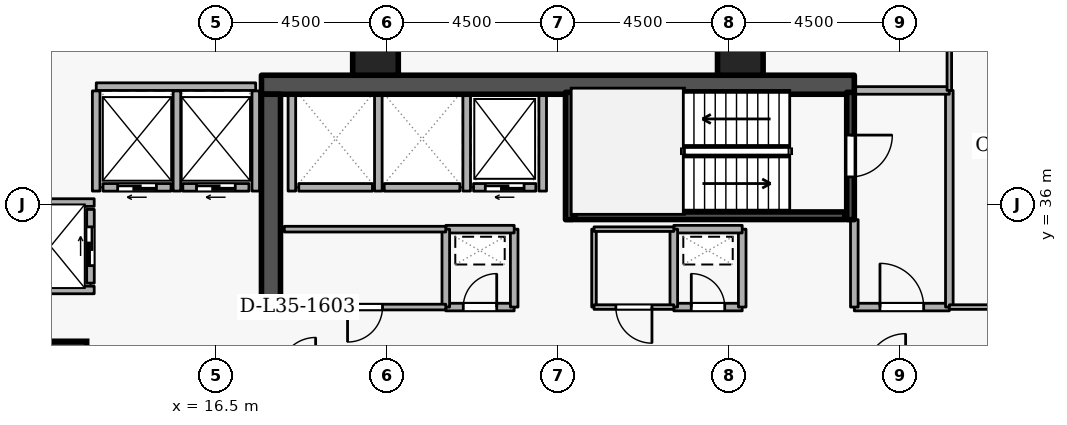
"""IFC4 building model, lengths in metres.
Left out: names, types, materials, properties, quantities, classifications, styles, units other than length and angle.
Written with IfcOpenShell. Run it as: python <this file> out.ifc"""

import sys

from ifc_helpers import new_model, si_unit, direction, frame, frame_2d, origin, origin_2d, place, context, subcontext, project, spatial, rectangle, extrude, element, fill, save


model = new_model("IFC4")
c1 = context("Model", 3, precision=1e-05, world=origin(), true_north=direction((0.0, 1.0)))
c2 = subcontext(c1, "Body", "Model", "MODEL_VIEW")
j1 = project(units=[si_unit("LENGTHUNIT", "METRE"), si_unit("PLANEANGLEUNIT", "RADIAN")], contexts=[c1])
p1 = place(None, origin())
s1 = spatial("IfcSite", under=j1, at=p1, CompositionType="ELEMENT")
p2 = place(p1, origin())
s2 = spatial("IfcBuilding", under=s1, at=p2, CompositionType="ELEMENT")
p3 = place(p2, frame((0.0, 0.0, 134.1)))
s3 = spatial("IfcBuildingStorey", under=s2, at=p3, CompositionType="ELEMENT", Elevation=134.1)
p4 = place(p3, frame((17.7, 39.15, 0.0), z_axis=(0.0, 0.0, 1.0), x_axis=(1.0, 0.0, 0.0)))
e1 = element("IfcWall", 1, at=p4, inside=s3, PredefinedType="SHEAR", context=c2, shape_type="SweptSolid", body=[
    extrude(rectangle(XDim=15.6, YDim=0.5, at=frame_2d((7.8, 0.0))), origin(), (0.0, 0.0, 1.0), 3.6),
])
p5 = place(p3, frame((17.95, 33.1, 0.0), z_axis=(0.0, 0.0, 1.0), x_axis=(0.0, 1.0, 0.0)))
e2 = element("IfcWall", 2, at=p5, inside=s3, PredefinedType="SHEAR", context=c2, shape_type="SweptSolid", body=[
    extrude(rectangle(XDim=5.8, YDim=0.5, at=frame_2d((2.9, 0.0))), origin(), (0.0, 0.0, 1.0), 3.6),
])
for number, where, z_axis, x_axis in (
    (3, (12.5, 31.8, 0.0), (0.0, 0.0, 1.0), (1.0, 0.0, 0.0)),
    (4, (20.7, 40.0, 0.0), (0.0, 0.0, 1.0), (1.0, 0.0, 0.0)),
    (5, (30.3, 40.0, 0.0), (0.0, 0.0, 1.0), (1.0, 0.0, 0.0)),
):
    element("IfcColumn", number, at=place(p3, frame(where, z_axis=z_axis, x_axis=x_axis)), inside=s3, PredefinedType="COLUMN", context=c2, shape_type="SweptSolid", body=[
        extrude(rectangle(XDim=1.2, YDim=1.2, at=origin_2d()), origin(), (0.0, 0.0, 1.0), 3.6),
    ])
p6 = place(p3, frame((24.92, 36.45, 0.0), z_axis=(0.0, 0.0, 1.0), x_axis=(-1.0, 0.0, 0.0)))
e6 = element("IfcWall", 6, at=p6, inside=s3, PredefinedType="STANDARD", context=c2, shape_type="SweptSolid", body=[
    extrude(rectangle(XDim=1.64, YDim=0.2, at=frame_2d((0.82, 0.0))), origin(), (0.0, 0.0, 1.0), 3.34),
])
p7 = place(p6, frame((0.31, 0.0, 0.0)))
e7 = element("IfcOpeningElement", 7, at=p7, cuts=e6, PredefinedType="OPENING", context=c2, shape_type="SweptSolid", body=[
    extrude(rectangle(XDim=1.02, YDim=2.06, at=frame_2d((0.51, 1.03))), frame((0.0, 0.11, 0.0), z_axis=(0.0, -1.0, 0.0), x_axis=(1.0, 0.0, 0.0)), (0.0, 0.0, 1.0), 0.22),
])
p8 = place(p3, frame((22.92, 36.45, 0.0), z_axis=(0.0, 0.0, 1.0), x_axis=(-1.0, 0.0, 0.0)))
e8 = element("IfcWall", 8, at=p8, inside=s3, PredefinedType="STANDARD", context=c2, shape_type="SweptSolid", body=[
    extrude(rectangle(XDim=1.99, YDim=0.2, at=frame_2d((0.995, 0.0))), origin(), (0.0, 0.0, 1.0), 3.34),
])
p9 = place(p3, frame((20.62, 36.45, 0.0), z_axis=(0.0, 0.0, 1.0), x_axis=(-1.0, 0.0, 0.0)))
e9 = element("IfcWall", 9, at=p9, inside=s3, PredefinedType="STANDARD", context=c2, shape_type="SweptSolid", body=[
    extrude(rectangle(XDim=1.94, YDim=0.2, at=frame_2d((0.97, 0.0))), origin(), (0.0, 0.0, 1.0), 3.34),
])
p10 = place(p3, frame((17.37, 36.45, 0.0), z_axis=(0.0, 0.0, 1.0), x_axis=(-1.0, 0.0, 0.0)))
e10 = element("IfcWall", 10, at=p10, inside=s3, PredefinedType="STANDARD", context=c2, shape_type="SweptSolid", body=[
    extrude(rectangle(XDim=1.74, YDim=0.2, at=frame_2d((0.87, 0.0))), origin(), (0.0, 0.0, 1.0), 3.34),
])
p11 = place(p10, frame((0.36, 0.0, 0.0)))
e11 = element("IfcOpeningElement", 11, at=p11, cuts=e10, PredefinedType="OPENING", context=c2, shape_type="SweptSolid", body=[
    extrude(rectangle(XDim=1.02, YDim=2.06, at=frame_2d((0.51, 1.03))), frame((0.0, 0.11, 0.0), z_axis=(0.0, -1.0, 0.0), x_axis=(1.0, 0.0, 0.0)), (0.0, 0.0, 1.0), 0.22),
])
p12 = place(p3, frame((15.32, 36.45, 0.0), z_axis=(0.0, 0.0, 1.0), x_axis=(-1.0, 0.0, 0.0)))
e12 = element("IfcWall", 12, at=p12, inside=s3, PredefinedType="STANDARD", context=c2, shape_type="SweptSolid", body=[
    extrude(rectangle(XDim=1.79, YDim=0.2, at=frame_2d((0.895, 0.0))), origin(), (0.0, 0.0, 1.0), 3.34),
])
p13 = place(p12, frame((0.385, 0.0, 0.0)))
e13 = element("IfcOpeningElement", 13, at=p13, cuts=e12, PredefinedType="OPENING", context=c2, shape_type="SweptSolid", body=[
    extrude(rectangle(XDim=1.02, YDim=2.06, at=frame_2d((0.51, 1.03))), frame((0.0, 0.11, 0.0), z_axis=(0.0, -1.0, 0.0), x_axis=(1.0, 0.0, 0.0)), (0.0, 0.0, 1.0), 0.22),
])
p14 = place(p3, frame((13.2, 33.93, 0.0), z_axis=(0.0, 0.0, 1.0), x_axis=(0.0, 1.0, 0.0)))
e14 = element("IfcWall", 14, at=p14, inside=s3, PredefinedType="STANDARD", context=c2, shape_type="SweptSolid", body=[
    extrude(rectangle(XDim=1.94, YDim=0.2, at=frame_2d((0.97, 0.0))), origin(), (0.0, 0.0, 1.0), 3.34),
])
p15 = place(p14, frame((0.46, 0.0, 0.0)))
e15 = element("IfcOpeningElement", 15, at=p15, cuts=e14, PredefinedType="OPENING", context=c2, shape_type="SweptSolid", body=[
    extrude(rectangle(XDim=1.02, YDim=2.06, at=frame_2d((0.51, 1.03))), frame((0.0, 0.11, 0.0), z_axis=(0.0, -1.0, 0.0), x_axis=(1.0, 0.0, 0.0)), (0.0, 0.0, 1.0), 0.22),
])
for number, where, z_axis, x_axis in (
    (16, (25.1, 36.352, 0.0), (0.0, 0.0, 1.0), (0.0, 1.0, 0.0)),
    (17, (23.1, 36.352, 0.0), (0.0, 0.0, 1.0), (0.0, 1.0, 0.0)),
    (18, (20.775, 36.352, 0.0), (0.0, 0.0, 1.0), (0.0, 1.0, 0.0)),
    (19, (18.5, 36.352, 0.0), (0.0, 0.0, 1.0), (0.0, 1.0, 0.0)),
):
    element("IfcWall", number, at=place(p3, frame(where, z_axis=z_axis, x_axis=x_axis)), inside=s3, PredefinedType="STANDARD", context=c2, shape_type="SweptSolid", body=[
        extrude(rectangle(XDim=2.536, YDim=0.2, at=frame_2d((1.268, 0.0))), origin(), (0.0, 0.0, 1.0), 3.34),
    ])
p16 = place(p3, frame((13.352, 39.1, 0.0), z_axis=(0.0, 0.0, 1.0), x_axis=(1.0, 0.0, 0.0)))
e20 = element("IfcWall", 20, at=p16, inside=s3, PredefinedType="STANDARD", context=c2, shape_type="SweptSolid", body=[
    extrude(rectangle(XDim=4.196, YDim=0.2, at=frame_2d((2.098, 0.0))), origin(), (0.0, 0.0, 1.0), 3.34),
])
p17 = place(p3, frame((17.55, 36.352, 0.0), z_axis=(0.0, 0.0, 1.0), x_axis=(0.0, 1.0, 0.0)))
e21 = element("IfcWall", 21, at=p17, inside=s3, PredefinedType="STANDARD", context=c2, shape_type="SweptSolid", body=[
    extrude(rectangle(XDim=2.636, YDim=0.2, at=frame_2d((1.318, 0.0))), origin(), (0.0, 0.0, 1.0), 2.545),
])
for number, where, z_axis, x_axis in (
    (22, (15.475, 36.352, 0.0), (0.0, 0.0, 1.0), (0.0, 1.0, 0.0)),
    (23, (13.35, 36.352, 0.0), (0.0, 0.0, 1.0), (0.0, 1.0, 0.0)),
):
    element("IfcWall", number, at=place(p3, frame(where, z_axis=z_axis, x_axis=x_axis)), inside=s3, PredefinedType="STANDARD", context=c2, shape_type="SweptSolid", body=[
        extrude(rectangle(XDim=2.636, YDim=0.2, at=frame_2d((1.318, 0.0))), origin(), (0.0, 0.0, 1.0), 3.34),
    ])
for number, where, z_axis, x_axis in (
    (24, (11.002, 36.05, 0.0), (0.0, 0.0, 1.0), (1.0, 0.0, 0.0)),
    (25, (11.002, 33.75, 0.0), (0.0, 0.0, 1.0), (1.0, 0.0, 0.0)),
):
    element("IfcWall", number, at=place(p3, frame(where, z_axis=z_axis, x_axis=x_axis)), inside=s3, PredefinedType="STANDARD", context=c2, shape_type="SweptSolid", body=[
        extrude(rectangle(XDim=2.296, YDim=0.2, at=frame_2d((1.148, 0.0))), origin(), (0.0, 0.0, 1.0), 3.34),
    ])
p18 = place(p3, frame((33.2, 38.95, 0.0), z_axis=(0.0, 0.0, 1.0), x_axis=(0.0, -1.0, 0.0)))
e26 = element("IfcWall", 26, at=p18, inside=s3, PredefinedType="SHEAR", context=c2, shape_type="SweptSolid", body=[
    extrude(rectangle(XDim=3.35, YDim=0.2, at=frame_2d((1.675, 0.0))), origin(), (0.0, 0.0, 1.0), 3.6),
])
p19 = place(p18, frame((1.125, 0.0, 0.0)))
e27 = element("IfcOpeningElement", 27, at=p19, cuts=e26, PredefinedType="OPENING", context=c2, shape_type="SweptSolid", body=[
    extrude(rectangle(XDim=1.1, YDim=2.1, at=frame_2d((0.55, 1.05))), frame((0.0, 0.11, 0.0), z_axis=(0.0, -1.0, 0.0), x_axis=(1.0, 0.0, 0.0)), (0.0, 0.0, 1.0), 0.22),
])
p20 = place(p3, frame((25.8, 35.6, 0.0), z_axis=(0.0, 0.0, 1.0), x_axis=(0.0, 1.0, 0.0)))
e28 = element("IfcWall", 28, at=p20, inside=s3, PredefinedType="SHEAR", context=c2, shape_type="SweptSolid", body=[
    extrude(rectangle(XDim=3.35, YDim=0.2, at=frame_2d((1.675, 0.0))), origin(), (0.0, 0.0, 1.0), 3.6),
])
p21 = place(p3, frame((25.95, 35.703, 0.0), z_axis=(0.0, 0.0, 1.0), x_axis=(1.0, 0.0, 0.0)))
e29 = element("IfcWall", 29, at=p21, inside=s3, PredefinedType="SHEAR", context=c2, shape_type="SweptSolid", body=[
    extrude(rectangle(XDim=7.1, YDim=0.2, at=frame_2d((3.55, 0.0))), origin(), (0.0, 0.0, 1.0), 3.6),
])
p22 = place(p3, frame((33.3, 33.3, 0.0), z_axis=(0.0, 0.0, 1.0), x_axis=(1.0, 0.0, 0.0)))
e30 = element("IfcWall", 30, at=p22, inside=s3, PredefinedType="STANDARD", context=c2, shape_type="SweptSolid", body=[
    extrude(rectangle(XDim=2.5, YDim=0.2, at=frame_2d((1.25, 0.0))), origin(), (0.0, 0.0, 1.0), 3.34),
])
p23 = place(p22, frame((0.675, 0.0, 0.0)))
e31 = element("IfcOpeningElement", 31, at=p23, cuts=e30, PredefinedType="OPENING", context=c2, shape_type="SweptSolid", body=[
    extrude(rectangle(XDim=1.15, YDim=2.1, at=frame_2d((0.575, 1.05))), frame((0.0, 0.11, 0.0), z_axis=(0.0, -1.0, 0.0), x_axis=(1.0, 0.0, 0.0)), (0.0, 0.0, 1.0), 0.22),
])
p24 = place(p3, frame((35.8, 33.3, 0.0), z_axis=(0.0, 0.0, 1.0), x_axis=(0.0, 1.0, 0.0)))
e32 = element("IfcWall", 32, at=p24, inside=s3, PredefinedType="STANDARD", context=c2, shape_type="SweptSolid", body=[
    extrude(rectangle(XDim=5.7, YDim=0.2, at=frame_2d((2.85, 0.0))), origin(), (0.0, 0.0, 1.0), 3.34),
])
p25 = place(p3, frame((35.8, 39.0, 0.0), z_axis=(0.0, 0.0, 1.0), x_axis=(-1.0, 0.0, 0.0)))
e33 = element("IfcWall", 33, at=p25, inside=s3, PredefinedType="STANDARD", context=c2, shape_type="SweptSolid", body=[
    extrude(rectangle(XDim=2.5, YDim=0.2, at=frame_2d((1.25, 0.0))), origin(), (0.0, 0.0, 1.0), 3.34),
])
p26 = place(p3, frame((33.3, 35.6, 0.0), z_axis=(0.0, 0.0, 1.0), x_axis=(0.0, -1.0, 0.0)))
e34 = element("IfcWall", 34, at=p26, inside=s3, PredefinedType="STANDARD", context=c2, shape_type="SweptSolid", body=[
    extrude(rectangle(XDim=2.3, YDim=0.2, at=frame_2d((1.15, 0.0))), origin(), (0.0, 0.0, 1.0), 2.545),
])
p27 = place(p3, frame((22.55, 33.3, 0.0), z_axis=(0.0, 0.0, 1.0), x_axis=(1.0, 0.0, 0.0)))
e35 = element("IfcWall", 35, at=p27, inside=s3, PredefinedType="STANDARD", context=c2, shape_type="SweptSolid", body=[
    extrude(rectangle(XDim=1.8, YDim=0.2, at=frame_2d((0.9, 0.0))), origin(), (0.0, 0.0, 1.0), 3.34),
])
p28 = place(p27, frame((0.46, 0.0, 0.0)))
e36 = element("IfcOpeningElement", 36, at=p28, cuts=e35, PredefinedType="OPENING", context=c2, shape_type="SweptSolid", body=[
    extrude(rectangle(XDim=0.88, YDim=2.04, at=frame_2d((0.44, 1.02))), frame((0.0, 0.11, 0.0), z_axis=(0.0, -1.0, 0.0), x_axis=(1.0, 0.0, 0.0)), (0.0, 0.0, 1.0), 0.22),
])
p29 = place(p3, frame((24.35, 33.3, 0.0), z_axis=(0.0, 0.0, 1.0), x_axis=(0.0, 1.0, 0.0)))
e37 = element("IfcWall", 37, at=p29, inside=s3, PredefinedType="STANDARD", context=c2, shape_type="SweptSolid", body=[
    extrude(rectangle(XDim=2.05, YDim=0.2, at=frame_2d((1.025, 0.0))), origin(), (0.0, 0.0, 1.0), 3.34),
])
p30 = place(p3, frame((24.35, 35.35, 0.0), z_axis=(0.0, 0.0, 1.0), x_axis=(-1.0, 0.0, 0.0)))
e38 = element("IfcWall", 38, at=p30, inside=s3, PredefinedType="STANDARD", context=c2, shape_type="SweptSolid", body=[
    extrude(rectangle(XDim=1.8, YDim=0.2, at=frame_2d((0.9, 0.0))), origin(), (0.0, 0.0, 1.0), 3.34),
])
p31 = place(p3, frame((22.55, 35.35, 0.0), z_axis=(0.0, 0.0, 1.0), x_axis=(0.0, -1.0, 0.0)))
e39 = element("IfcWall", 39, at=p31, inside=s3, PredefinedType="STANDARD", context=c2, shape_type="SweptSolid", body=[
    extrude(rectangle(XDim=2.05, YDim=0.2, at=frame_2d((1.025, 0.0))), origin(), (0.0, 0.0, 1.0), 3.34),
])
p32 = place(p3, frame((28.55, 33.3, 0.0), z_axis=(0.0, 0.0, 1.0), x_axis=(1.0, 0.0, 0.0)))
e40 = element("IfcWall", 40, at=p32, inside=s3, PredefinedType="STANDARD", context=c2, shape_type="SweptSolid", body=[
    extrude(rectangle(XDim=1.8, YDim=0.2, at=frame_2d((0.9, 0.0))), origin(), (0.0, 0.0, 1.0), 3.34),
])
p33 = place(p32, frame((0.46, 0.0, 0.0)))
e41 = element("IfcOpeningElement", 41, at=p33, cuts=e40, PredefinedType="OPENING", context=c2, shape_type="SweptSolid", body=[
    extrude(rectangle(XDim=0.88, YDim=2.04, at=frame_2d((0.44, 1.02))), frame((0.0, 0.11, 0.0), z_axis=(0.0, -1.0, 0.0), x_axis=(1.0, 0.0, 0.0)), (0.0, 0.0, 1.0), 0.22),
])
p34 = place(p3, frame((30.35, 33.3, 0.0), z_axis=(0.0, 0.0, 1.0), x_axis=(0.0, 1.0, 0.0)))
e42 = element("IfcWall", 42, at=p34, inside=s3, PredefinedType="STANDARD", context=c2, shape_type="SweptSolid", body=[
    extrude(rectangle(XDim=2.05, YDim=0.2, at=frame_2d((1.025, 0.0))), origin(), (0.0, 0.0, 1.0), 3.34),
])
p35 = place(p3, frame((30.35, 35.35, 0.0), z_axis=(0.0, 0.0, 1.0), x_axis=(-1.0, 0.0, 0.0)))
e43 = element("IfcWall", 43, at=p35, inside=s3, PredefinedType="STANDARD", context=c2, shape_type="SweptSolid", body=[
    extrude(rectangle(XDim=1.8, YDim=0.2, at=frame_2d((0.9, 0.0))), origin(), (0.0, 0.0, 1.0), 3.34),
])
p36 = place(p3, frame((28.55, 35.35, 0.0), z_axis=(0.0, 0.0, 1.0), x_axis=(0.0, -1.0, 0.0)))
e44 = element("IfcWall", 44, at=p36, inside=s3, PredefinedType="STANDARD", context=c2, shape_type="SweptSolid", body=[
    extrude(rectangle(XDim=2.05, YDim=0.2, at=frame_2d((1.025, 0.0))), origin(), (0.0, 0.0, 1.0), 3.34),
])
p37 = place(p3, frame((18.3, 35.35, 0.0), z_axis=(0.0, 0.0, 1.0), x_axis=(1.0, 0.0, 0.0)))
e45 = element("IfcWall", 45, at=p37, inside=s3, PredefinedType="PARTITIONING", context=c2, shape_type="SweptSolid", body=[
    extrude(rectangle(XDim=4.25, YDim=0.15, at=frame_2d((2.125, 0.0))), origin(), (0.0, 0.0, 1.0), 3.34),
])
p38 = place(p3, frame((22.55, 33.3, 0.0), z_axis=(0.0, 0.0, 1.0), x_axis=(-1.0, 0.0, 0.0)))
e46 = element("IfcWall", 46, at=p38, inside=s3, PredefinedType="PARTITIONING", context=c2, shape_type="SweptSolid", body=[
    extrude(rectangle(XDim=4.25, YDim=0.15, at=frame_2d((2.125, 0.0))), origin(), (0.0, 0.0, 1.0), 3.34),
])
p39 = place(p38, frame((1.665, 0.0, 0.0)))
e47 = element("IfcOpeningElement", 47, at=p39, cuts=e46, PredefinedType="OPENING", context=c2, shape_type="SweptSolid", body=[
    extrude(rectangle(XDim=0.92, YDim=2.08, at=frame_2d((0.46, 1.04))), frame((0.0, 0.085, 0.0), z_axis=(0.0, -1.0, 0.0), x_axis=(1.0, 0.0, 0.0)), (0.0, 0.0, 1.0), 0.17),
])
p40 = place(p3, frame((26.45, 33.3, 0.0), z_axis=(0.0, 0.0, 1.0), x_axis=(0.0, 1.0, 0.0)))
e48 = element("IfcWall", 48, at=p40, inside=s3, PredefinedType="PARTITIONING", context=c2, shape_type="SweptSolid", body=[
    extrude(rectangle(XDim=2.05, YDim=0.12, at=frame_2d((1.025, 0.0))), origin(), (0.0, 0.0, 1.0), 3.34),
])
p41 = place(p3, frame((26.45, 35.35, 0.0), z_axis=(0.0, 0.0, 1.0), x_axis=(1.0, 0.0, 0.0)))
e49 = element("IfcWall", 49, at=p41, inside=s3, PredefinedType="PARTITIONING", context=c2, shape_type="SweptSolid", body=[
    extrude(rectangle(XDim=2.1, YDim=0.12, at=frame_2d((1.05, 0.0))), origin(), (0.0, 0.0, 1.0), 3.34),
])
p42 = place(p3, frame((28.55, 33.3, 0.0), z_axis=(0.0, 0.0, 1.0), x_axis=(-1.0, 0.0, 0.0)))
e50 = element("IfcWall", 50, at=p42, inside=s3, PredefinedType="PARTITIONING", context=c2, shape_type="SweptSolid", body=[
    extrude(rectangle(XDim=2.1, YDim=0.12, at=frame_2d((1.05, 0.0))), origin(), (0.0, 0.0, 1.0), 3.34),
])
p43 = place(p42, frame((0.575, 0.0, 0.0)))
e51 = element("IfcOpeningElement", 51, at=p43, cuts=e50, PredefinedType="OPENING", context=c2, shape_type="SweptSolid", body=[
    extrude(rectangle(XDim=0.95, YDim=2.1, at=frame_2d((0.475, 1.05))), frame((0.0, 0.07, 0.0), z_axis=(0.0, -1.0, 0.0), x_axis=(1.0, 0.0, 0.0)), (0.0, 0.0, 1.0), 0.14),
])
p44 = place(p3, frame((37.75, 33.3, 0.0), z_axis=(0.0, 0.0, 1.0), x_axis=(-1.0, 0.0, 0.0)))
e52 = element("IfcWall", 52, at=p44, inside=s3, PredefinedType="PARTITIONING", context=c2, shape_type="SweptSolid", body=[
    extrude(rectangle(XDim=1.95, YDim=0.12, at=frame_2d((0.975, 0.0))), origin(), (0.0, 0.0, 1.0), 3.34),
])
p45 = place(p3, frame((35.8, 39.0, 0.0), z_axis=(0.0, 0.0, 1.0), x_axis=(0.0, 1.0, 0.0)))
e53 = element("IfcWall", 53, at=p45, inside=s3, PredefinedType="PARTITIONING", context=c2, shape_type="SweptSolid", body=[
    extrude(rectangle(XDim=5.72, YDim=0.12, at=frame_2d((2.86, 0.0))), origin(), (0.0, 0.0, 1.0), 3.34),
])
p46 = place(p7, origin())
e54 = element("IfcDoor", 54, at=p46, inside=s3, OperationType="SLIDING_TO_LEFT", PredefinedType="DOOR", context=c2, shape_type="SweptSolid", body=[
    extrude(rectangle(XDim=1.02, YDim=2.06, at=frame_2d((0.51, 1.03))), frame((0.0, 0.025, 0.0), z_axis=(0.0, -1.0, 0.0), x_axis=(1.0, 0.0, 0.0)), (0.0, 0.0, 1.0), 0.05),
])
fill(e7, e54)
p47 = place(p11, origin())
e55 = element("IfcDoor", 55, at=p47, inside=s3, OperationType="SLIDING_TO_LEFT", PredefinedType="DOOR", context=c2, shape_type="SweptSolid", body=[
    extrude(rectangle(XDim=1.02, YDim=2.06, at=frame_2d((0.51, 1.03))), frame((0.0, 0.025, 0.0), z_axis=(0.0, -1.0, 0.0), x_axis=(1.0, 0.0, 0.0)), (0.0, 0.0, 1.0), 0.05),
])
fill(e11, e55)
p48 = place(p13, origin())
e56 = element("IfcDoor", 56, at=p48, inside=s3, OperationType="SLIDING_TO_LEFT", PredefinedType="DOOR", context=c2, shape_type="SweptSolid", body=[
    extrude(rectangle(XDim=1.02, YDim=2.06, at=frame_2d((0.51, 1.03))), frame((0.0, 0.025, 0.0), z_axis=(0.0, -1.0, 0.0), x_axis=(1.0, 0.0, 0.0)), (0.0, 0.0, 1.0), 0.05),
])
fill(e13, e56)
p49 = place(p15, origin())
e57 = element("IfcDoor", 57, at=p49, inside=s3, OperationType="SLIDING_TO_LEFT", PredefinedType="DOOR", context=c2, shape_type="SweptSolid", body=[
    extrude(rectangle(XDim=1.02, YDim=2.06, at=frame_2d((0.51, 1.03))), frame((0.0, 0.025, 0.0), z_axis=(0.0, -1.0, 0.0), x_axis=(1.0, 0.0, 0.0)), (0.0, 0.0, 1.0), 0.05),
])
fill(e15, e57)
p50 = place(p19, origin())
e58 = element("IfcDoor", 58, at=p50, inside=s3, OperationType="SINGLE_SWING_LEFT", PredefinedType="DOOR", context=c2, shape_type="SweptSolid", body=[
    extrude(rectangle(XDim=1.1, YDim=2.1, at=frame_2d((0.55, 1.05))), frame((0.0, 0.025, 0.0), z_axis=(0.0, -1.0, 0.0), x_axis=(1.0, 0.0, 0.0)), (0.0, 0.0, 1.0), 0.05),
])
fill(e27, e58)
p51 = place(p23, origin())
e59 = element("IfcDoor", 59, at=p51, inside=s3, OperationType="SINGLE_SWING_LEFT", PredefinedType="DOOR", context=c2, shape_type="SweptSolid", body=[
    extrude(rectangle(XDim=1.15, YDim=2.1, at=frame_2d((0.575, 1.05))), frame((0.0, 0.025, 0.0), z_axis=(0.0, -1.0, 0.0), x_axis=(1.0, 0.0, 0.0)), (0.0, 0.0, 1.0), 0.05),
])
fill(e31, e59)
p52 = place(p28, origin())
e60 = element("IfcDoor", 60, at=p52, inside=s3, OperationType="SINGLE_SWING_RIGHT", PredefinedType="DOOR", context=c2, shape_type="SweptSolid", body=[
    extrude(rectangle(XDim=0.88, YDim=2.04, at=frame_2d((0.44, 1.02))), frame((0.0, 0.025, 0.0), z_axis=(0.0, -1.0, 0.0), x_axis=(1.0, 0.0, 0.0)), (0.0, 0.0, 1.0), 0.05),
])
fill(e36, e60)
p53 = place(p33, origin())
e61 = element("IfcDoor", 61, at=p53, inside=s3, OperationType="SINGLE_SWING_LEFT", PredefinedType="DOOR", context=c2, shape_type="SweptSolid", body=[
    extrude(rectangle(XDim=0.88, YDim=2.04, at=frame_2d((0.44, 1.02))), frame((0.0, 0.025, 0.0), z_axis=(0.0, -1.0, 0.0), x_axis=(1.0, 0.0, 0.0)), (0.0, 0.0, 1.0), 0.05),
])
fill(e41, e61)
p54 = place(p39, origin())
e62 = element("IfcDoor", 62, at=p54, inside=s3, OperationType="SINGLE_SWING_RIGHT", PredefinedType="DOOR", context=c2, shape_type="SweptSolid", body=[
    extrude(rectangle(XDim=0.92, YDim=2.08, at=frame_2d((0.46, 1.04))), frame((0.0, 0.025, 0.0), z_axis=(0.0, -1.0, 0.0), x_axis=(1.0, 0.0, 0.0)), (0.0, 0.0, 1.0), 0.05),
])
fill(e47, e62)
p55 = place(p43, origin())
e63 = element("IfcDoor", 63, at=p55, inside=s3, OperationType="SINGLE_SWING_LEFT", PredefinedType="DOOR", context=c2, shape_type="SweptSolid", body=[
    extrude(rectangle(XDim=0.95, YDim=2.1, at=frame_2d((0.475, 1.05))), frame((0.0, 0.025, 0.0), z_axis=(0.0, -1.0, 0.0), x_axis=(1.0, 0.0, 0.0)), (0.0, 0.0, 1.0), 0.05),
])
fill(e51, e63)
save(model, sys.argv[1])
